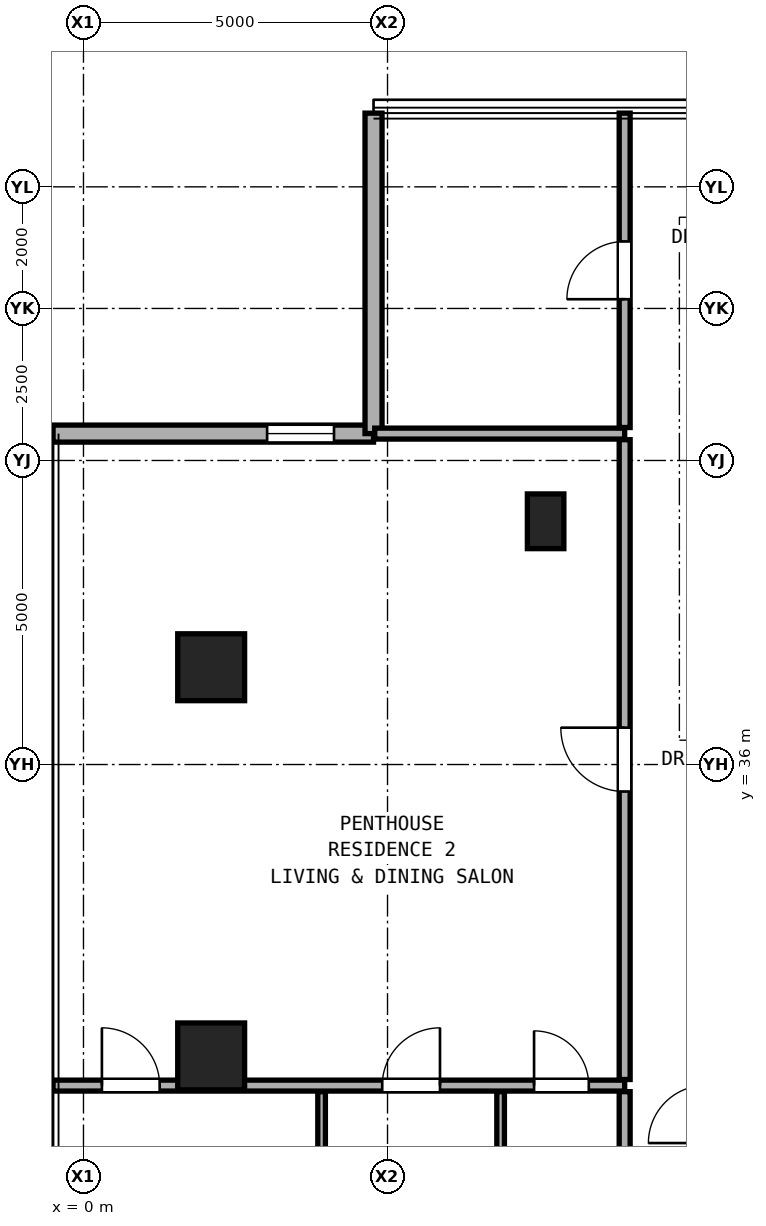
"""IFC4 building model, lengths in metres.
Left out: names, types, materials, properties, quantities, classifications, styles, units other than length and angle.
Written with IfcOpenShell. Run it as: python <this file> out.ifc"""

import sys

from ifc_helpers import new_model, si_unit, direction, frame, frame_2d, origin, origin_2d, place, context, subcontext, project, spatial, rectangle, hollow_rectangle, extrude, element, fill, save


model = new_model("IFC4")
c1 = context("Model", 3, precision=1e-05, world=origin(), true_north=direction((0.0, 1.0)))
c2 = subcontext(c1, "Body", "Model", "MODEL_VIEW")
j1 = project(units=[si_unit("LENGTHUNIT", "METRE"), si_unit("PLANEANGLEUNIT", "RADIAN")], contexts=[c1])
p1 = place(None, origin())
s1 = spatial("IfcSite", under=j1, at=p1, CompositionType="ELEMENT")
p2 = place(p1, origin())
s2 = spatial("IfcBuilding", under=s1, at=p2, CompositionType="ELEMENT")
p3 = place(p2, frame((0.0, 0.0, 131.3)))
s3 = spatial("IfcBuildingStorey", under=s2, at=p3, CompositionType="ELEMENT", Elevation=131.3)
for number, where, z_axis, x_axis in (
    (1, (2.1, 31.2, 0.0), (0.0, 0.0, 1.0), (1.0, 0.0, 0.0)),
    (2, (2.1, 37.6, 0.0), (0.0, 0.0, 1.0), (1.0, 0.0, 0.0)),
):
    element("IfcColumn", number, at=place(p3, frame(where, z_axis=z_axis, x_axis=x_axis)), inside=s3, PredefinedType="COLUMN", context=c2, shape_type="SweptSolid", body=[
        extrude(hollow_rectangle(XDim=1.1, YDim=1.1, WallThickness=0.06, at=origin_2d()), origin(), (0.0, 0.0, 1.0), 3.3),
    ])
p4 = place(p3, frame((7.6, 40.0, 0.0), z_axis=(0.0, 0.0, 1.0), x_axis=(1.0, 0.0, 0.0)))
e3 = element("IfcColumn", 3, at=p4, inside=s3, PredefinedType="PILASTER", context=c2, shape_type="SweptSolid", body=[
    extrude(rectangle(XDim=0.6, YDim=0.9, at=origin_2d()), origin(), (0.0, 0.0, 1.0), 3.3),
])
p5 = place(p3, frame((4.77, 41.442, 0.0), z_axis=(0.0, 0.0, 1.0), x_axis=(-1.0, 0.0, 0.0)))
e4 = element("IfcWall", 4, at=p5, inside=s3, PredefinedType="SOLIDWALL", context=c2, shape_type="SweptSolid", body=[
    extrude(rectangle(XDim=5.27, YDim=0.28, at=frame_2d((2.635, 0.0))), origin(), (0.0, 0.0, 1.0), 3.06),
])
p6 = place(p5, frame((0.65, 0.0, 0.85)))
e5 = element("IfcOpeningElement", 5, at=p6, cuts=e4, PredefinedType="OPENING", context=c2, shape_type="SweptSolid", body=[
    extrude(rectangle(XDim=1.1, YDim=2.0, at=frame_2d((0.55, 1.0))), frame((0.0, 0.15, 0.0), z_axis=(0.0, -1.0, 0.0), x_axis=(1.0, 0.0, 0.0)), (0.0, 0.0, 1.0), 0.3),
])
p7 = place(p3, frame((4.77, 46.712, 0.0), z_axis=(0.0, 0.0, 1.0), x_axis=(0.0, -1.0, 0.0)))
e6 = element("IfcWall", 6, at=p7, inside=s3, PredefinedType="SOLIDWALL", context=c2, shape_type="SweptSolid", body=[
    extrude(rectangle(XDim=5.27, YDim=0.28, at=frame_2d((2.635, 0.0))), origin(), (0.0, 0.0, 1.0), 3.06),
])
p8 = place(p3, frame((-0.5, 30.72, 0.0), z_axis=(0.0, 0.0, 1.0), x_axis=(1.0, 0.0, 0.0)))
e7 = element("IfcWall", 7, at=p8, inside=s3, PredefinedType="PARTITIONING", context=c2, shape_type="SweptSolid", body=[
    extrude(rectangle(XDim=9.4, YDim=0.18, at=frame_2d((4.7, 0.0))), origin(), (0.0, 0.0, 1.0), 2.299),
])
p9 = place(p8, frame((0.803, 0.0, 0.0)))
e8 = element("IfcOpeningElement", 8, at=p9, cuts=e7, PredefinedType="OPENING", context=c2, shape_type="SweptSolid", body=[
    extrude(rectangle(XDim=0.95, YDim=2.15, at=frame_2d((0.475, 1.075))), frame((0.0, 0.1, 0.0), z_axis=(0.0, -1.0, 0.0), x_axis=(1.0, 0.0, 0.0)), (0.0, 0.0, 1.0), 0.2),
])
p10 = place(p8, frame((5.413, 0.0, 0.0)))
e9 = element("IfcOpeningElement", 9, at=p10, cuts=e7, PredefinedType="OPENING", context=c2, shape_type="SweptSolid", body=[
    extrude(rectangle(XDim=0.95, YDim=2.15, at=frame_2d((0.475, 1.075))), frame((0.0, 0.1, 0.0), z_axis=(0.0, -1.0, 0.0), x_axis=(1.0, 0.0, 0.0)), (0.0, 0.0, 1.0), 0.2),
])
p11 = place(p8, frame((7.91, 0.0, 0.0)))
e10 = element("IfcOpeningElement", 10, at=p11, cuts=e7, PredefinedType="OPENING", context=c2, shape_type="SweptSolid", body=[
    extrude(rectangle(XDim=0.9, YDim=2.1, at=frame_2d((0.45, 1.05))), frame((0.0, 0.1, 0.0), z_axis=(0.0, -1.0, 0.0), x_axis=(1.0, 0.0, 0.0)), (0.0, 0.0, 1.0), 0.2),
])
p12 = place(p3, frame((4.79, 41.442, 0.0), z_axis=(0.0, 0.0, 1.0), x_axis=(1.0, 0.0, 0.0)))
e11 = element("IfcWall", 11, at=p12, inside=s3, PredefinedType="PARTITIONING", context=c2, shape_type="SweptSolid", body=[
    extrude(rectangle(XDim=4.11, YDim=0.18, at=frame_2d((2.055, 0.0))), origin(), (0.0, 0.0, 1.0), 3.08),
])
for number, where, z_axis, x_axis in (
    (12, (3.916, 28.073, 0.0), (0.0, 0.0, 1.0), (0.0, 1.0, 0.0)),
    (13, (6.86, 28.073, 0.0), (0.0, 0.0, 1.0), (0.0, 1.0, 0.0)),
):
    element("IfcWall", number, at=place(p3, frame(where, z_axis=z_axis, x_axis=x_axis)), inside=s3, PredefinedType="PARTITIONING", context=c2, shape_type="SweptSolid", body=[
        extrude(rectangle(XDim=2.548, YDim=0.125, at=frame_2d((1.274, 0.0))), origin(), (0.0, 0.0, 1.0), 3.08),
    ])
p13 = place(p3, frame((8.9, 28.073, 0.0), z_axis=(0.0, 0.0, 1.0), x_axis=(0.0, 1.0, 0.0)))
e14 = element("IfcWall", 14, at=p13, inside=s3, PredefinedType="PARTITIONING", context=c2, shape_type="SweptSolid", body=[
    extrude(rectangle(XDim=2.548, YDim=0.18, at=frame_2d((1.274, 0.0))), origin(), (0.0, 0.0, 1.0), 3.08),
])
p14 = place(p3, frame((8.9, 30.82, 0.0), z_axis=(0.0, 0.0, 1.0), x_axis=(0.0, 1.0, 0.0)))
e15 = element("IfcWall", 15, at=p14, inside=s3, PredefinedType="PARTITIONING", context=c2, shape_type="SweptSolid", body=[
    extrude(rectangle(XDim=10.522, YDim=0.18, at=frame_2d((5.261, 0.0))), origin(), (0.0, 0.0, 1.0), 2.299),
])
p15 = place(p14, frame((4.736, 0.0, 0.0)))
e16 = element("IfcOpeningElement", 16, at=p15, cuts=e15, PredefinedType="OPENING", context=c2, shape_type="SweptSolid", body=[
    extrude(rectangle(XDim=1.05, YDim=2.2, at=frame_2d((0.525, 1.1))), frame((0.0, 0.1, 0.0), z_axis=(0.0, -1.0, 0.0), x_axis=(1.0, 0.0, 0.0)), (0.0, 0.0, 1.0), 0.2),
])
p16 = place(p3, frame((8.9, 41.542, 0.0), z_axis=(0.0, 0.0, 1.0), x_axis=(0.0, 1.0, 0.0)))
e17 = element("IfcWall", 17, at=p16, inside=s3, PredefinedType="PARTITIONING", context=c2, shape_type="SweptSolid", body=[
    extrude(rectangle(XDim=5.17, YDim=0.18, at=frame_2d((2.585, 0.0))), origin(), (0.0, 0.0, 1.0), 3.08),
])
p17 = place(p16, frame((2.11, 0.0, 0.0)))
e18 = element("IfcOpeningElement", 18, at=p17, cuts=e17, PredefinedType="OPENING", context=c2, shape_type="SweptSolid", body=[
    extrude(rectangle(XDim=0.95, YDim=2.15, at=frame_2d((0.475, 1.075))), frame((0.0, 0.1, 0.0), z_axis=(0.0, -1.0, 0.0), x_axis=(1.0, 0.0, 0.0)), (0.0, 0.0, 1.0), 0.2),
])
p18 = place(p6, origin())
e19 = element("IfcWindow", 19, at=p18, inside=s3, PartitioningType="SINGLE_PANEL", PredefinedType="WINDOW", context=c2, shape_type="SweptSolid", body=[
    extrude(rectangle(XDim=1.1, YDim=2.0, at=frame_2d((0.55, 1.0))), frame((0.0, 0.03, 0.0), z_axis=(0.0, -1.0, 0.0), x_axis=(1.0, 0.0, 0.0)), (0.0, 0.0, 1.0), 0.06),
])
fill(e5, e19)
p19 = place(p15, origin())
e20 = element("IfcDoor", 20, at=p19, inside=s3, OperationType="SINGLE_SWING_RIGHT", PredefinedType="DOOR", context=c2, shape_type="SweptSolid", body=[
    extrude(rectangle(XDim=1.05, YDim=2.2, at=frame_2d((0.525, 1.1))), frame((0.0, 0.025, 0.0), z_axis=(0.0, -1.0, 0.0), x_axis=(1.0, 0.0, 0.0)), (0.0, 0.0, 1.0), 0.05),
])
fill(e16, e20)
p20 = place(p9, origin())
e21 = element("IfcDoor", 21, at=p20, inside=s3, OperationType="SINGLE_SWING_LEFT", PredefinedType="DOOR", context=c2, shape_type="SweptSolid", body=[
    extrude(rectangle(XDim=0.95, YDim=2.15, at=frame_2d((0.475, 1.075))), frame((0.0, 0.025, 0.0), z_axis=(0.0, -1.0, 0.0), x_axis=(1.0, 0.0, 0.0)), (0.0, 0.0, 1.0), 0.05),
])
fill(e8, e21)
p21 = place(p10, origin())
e22 = element("IfcDoor", 22, at=p21, inside=s3, OperationType="SINGLE_SWING_RIGHT", PredefinedType="DOOR", context=c2, shape_type="SweptSolid", body=[
    extrude(rectangle(XDim=0.95, YDim=2.15, at=frame_2d((0.475, 1.075))), frame((0.0, 0.025, 0.0), z_axis=(0.0, -1.0, 0.0), x_axis=(1.0, 0.0, 0.0)), (0.0, 0.0, 1.0), 0.05),
])
fill(e9, e22)
p22 = place(p11, origin())
e23 = element("IfcDoor", 23, at=p22, inside=s3, OperationType="SINGLE_SWING_LEFT", PredefinedType="DOOR", context=c2, shape_type="SweptSolid", body=[
    extrude(rectangle(XDim=0.9, YDim=2.1, at=frame_2d((0.45, 1.05))), frame((0.0, 0.025, 0.0), z_axis=(0.0, -1.0, 0.0), x_axis=(1.0, 0.0, 0.0)), (0.0, 0.0, 1.0), 0.05),
])
fill(e10, e23)
p23 = place(p17, origin())
e24 = element("IfcDoor", 24, at=p23, inside=s3, OperationType="SINGLE_SWING_LEFT", PredefinedType="DOOR", context=c2, shape_type="SweptSolid", body=[
    extrude(rectangle(XDim=0.95, YDim=2.15, at=frame_2d((0.475, 1.075))), frame((0.0, 0.025, 0.0), z_axis=(0.0, -1.0, 0.0), x_axis=(1.0, 0.0, 0.0)), (0.0, 0.0, 1.0), 0.05),
])
fill(e18, e24)
save(model, sys.argv[1])
